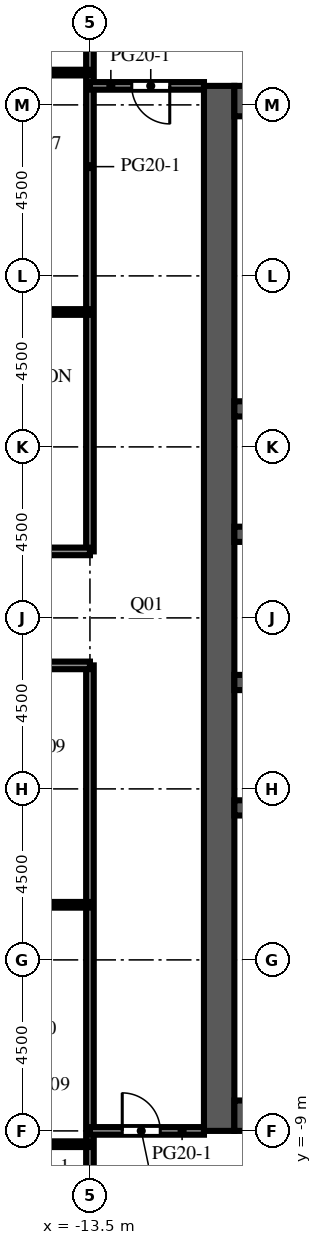
"""IFC4 building model, lengths in metres.
Left out: names, types, materials, properties, quantities, classifications, styles, units other than length and angle.
Written with IfcOpenShell. Run it as: python <this file> out.ifc"""

import sys

from ifc_helpers import new_model, si_unit, direction, frame, frame_2d, origin, place, context, subcontext, project, spatial, rectangle, extrude, element, fill, save


model = new_model("IFC4")
c1 = context("Model", 3, precision=1e-05, world=origin(), true_north=direction((0.0, 1.0)))
c2 = subcontext(c1, "Body", "Model", "MODEL_VIEW")
j1 = project(units=[si_unit("LENGTHUNIT", "METRE"), si_unit("PLANEANGLEUNIT", "RADIAN")], contexts=[c1])
p1 = place(None, origin())
s1 = spatial("IfcSite", under=j1, at=p1, CompositionType="ELEMENT")
p2 = place(p1, origin())
s2 = spatial("IfcBuilding", under=s1, at=p2, CompositionType="ELEMENT")
p3 = place(p2, frame((0.0, 0.0, 207.9)))
s3 = spatial("IfcBuildingStorey", under=s2, at=p3, CompositionType="ELEMENT", Elevation=207.9)
p4 = place(p3, frame((-10.1, -9.0, 0.0), z_axis=(0.0, 0.0, 1.0), x_axis=(0.0, 1.0, 0.0)))
e1 = element("IfcWall", 1, at=p4, inside=s3, PredefinedType="SHEAR", context=c2, shape_type="SweptSolid", body=[
    extrude(rectangle(XDim=27.5, YDim=0.8, at=frame_2d((13.75, 0.0))), origin(), (0.0, 0.0, 1.0), 4.1),
])
p5 = place(p4, frame((12.55, 0.0, 0.0)))
e2 = element("IfcOpeningElement", 2, at=p5, cuts=e1, PredefinedType="OPENING", context=c2, shape_type="SweptSolid", body=[
    extrude(rectangle(XDim=2.4, YDim=2.4, at=frame_2d((1.2, 1.2))), frame((0.0, 0.41, 0.0), z_axis=(0.0, -1.0, 0.0), x_axis=(1.0, 0.0, 0.0)), (0.0, 0.0, 1.0), 0.82),
])
p6 = place(p4, frame((6.825, 0.0, 0.0)))
e3 = element("IfcOpeningElement", 3, at=p6, cuts=e1, PredefinedType="OPENING", context=c2, shape_type="SweptSolid", body=[
    extrude(rectangle(XDim=1.2, YDim=2.1, at=frame_2d((0.6, 1.05))), frame((0.0, 0.41, 0.0), z_axis=(0.0, -1.0, 0.0), x_axis=(1.0, 0.0, 0.0)), (0.0, 0.0, 1.0), 0.82),
])
p7 = place(p4, frame((19.475, 0.0, 0.0)))
e4 = element("IfcOpeningElement", 4, at=p7, cuts=e1, PredefinedType="OPENING", context=c2, shape_type="SweptSolid", body=[
    extrude(rectangle(XDim=1.2, YDim=2.1, at=frame_2d((0.6, 1.05))), frame((0.0, 0.41, 0.0), z_axis=(0.0, -1.0, 0.0), x_axis=(1.0, 0.0, 0.0)), (0.0, 0.0, 1.0), 0.82),
])
for number, where, z_axis, x_axis in (
    (5, (-9.7, -8.6, 0.0), (0.0, 0.0, 1.0), (1.0, 0.0, 0.0)),
    (6, (-9.7, 18.1, 0.0), (0.0, 0.0, 1.0), (1.0, 0.0, 0.0)),
):
    element("IfcWall", number, at=place(p3, frame(where, z_axis=z_axis, x_axis=x_axis)), inside=s3, PredefinedType="SHEAR", context=c2, shape_type="SweptSolid", body=[
        extrude(rectangle(XDim=10.4, YDim=0.8, at=frame_2d((5.2, 0.0))), origin(), (0.0, 0.0, 1.0), 4.1),
    ])
p8 = place(p3, frame((-9.7, -0.5, 0.0), z_axis=(0.0, 0.0, 1.0), x_axis=(1.0, 0.0, 0.0)))
e7 = element("IfcWall", 7, at=p8, inside=s3, PredefinedType="SHEAR", context=c2, shape_type="SweptSolid", body=[
    extrude(rectangle(XDim=10.4, YDim=0.4, at=frame_2d((5.2, 0.0))), origin(), (0.0, 0.0, 1.0), 4.1),
])
p9 = place(p3, frame((-9.7, 2.8, 0.0), z_axis=(0.0, 0.0, 1.0), x_axis=(1.0, 0.0, 0.0)))
e8 = element("IfcWall", 8, at=p9, inside=s3, PredefinedType="SHEAR", context=c2, shape_type="SweptSolid", body=[
    extrude(rectangle(XDim=10.4, YDim=0.4, at=frame_2d((5.2, 0.0))), origin(), (0.0, 0.0, 1.0), 4.1),
])
p10 = place(p9, frame((0.738, 0.0, 0.0)))
e9 = element("IfcOpeningElement", 9, at=p10, cuts=e8, PredefinedType="OPENING", context=c2, shape_type="SweptSolid", body=[
    extrude(rectangle(XDim=1.1, YDim=2.1, at=frame_2d((0.55, 1.05))), frame((0.0, 0.21, 0.0), z_axis=(0.0, -1.0, 0.0), x_axis=(1.0, 0.0, 0.0)), (0.0, 0.0, 1.0), 0.42),
])
p11 = place(p9, frame((3.337, 0.0, 0.0)))
e10 = element("IfcOpeningElement", 10, at=p11, cuts=e8, PredefinedType="OPENING", context=c2, shape_type="SweptSolid", body=[
    extrude(rectangle(XDim=1.1, YDim=2.1, at=frame_2d((0.55, 1.05))), frame((0.0, 0.21, 0.0), z_axis=(0.0, -1.0, 0.0), x_axis=(1.0, 0.0, 0.0)), (0.0, 0.0, 1.0), 0.42),
])
p12 = place(p9, frame((6.012, 0.0, 0.0)))
e11 = element("IfcOpeningElement", 11, at=p12, cuts=e8, PredefinedType="OPENING", context=c2, shape_type="SweptSolid", body=[
    extrude(rectangle(XDim=1.0, YDim=2.1, at=frame_2d((0.5, 1.05))), frame((0.0, 0.21, 0.0), z_axis=(0.0, -1.0, 0.0), x_axis=(1.0, 0.0, 0.0)), (0.0, 0.0, 1.0), 0.42),
])
p13 = place(p9, frame((8.613, 0.0, 0.0)))
e12 = element("IfcOpeningElement", 12, at=p13, cuts=e8, PredefinedType="OPENING", context=c2, shape_type="SweptSolid", body=[
    extrude(rectangle(XDim=1.0, YDim=2.1, at=frame_2d((0.5, 1.05))), frame((0.0, 0.21, 0.0), z_axis=(0.0, -1.0, 0.0), x_axis=(1.0, 0.0, 0.0)), (0.0, 0.0, 1.0), 0.42),
])
p14 = place(p3, frame((-9.7, 6.7, 0.0), z_axis=(0.0, 0.0, 1.0), x_axis=(1.0, 0.0, 0.0)))
e13 = element("IfcWall", 13, at=p14, inside=s3, PredefinedType="SHEAR", context=c2, shape_type="SweptSolid", body=[
    extrude(rectangle(XDim=10.4, YDim=0.4, at=frame_2d((5.2, 0.0))), origin(), (0.0, 0.0, 1.0), 4.1),
])
p15 = place(p14, frame((3.337, 0.0, 0.0)))
e14 = element("IfcOpeningElement", 14, at=p15, cuts=e13, PredefinedType="OPENING", context=c2, shape_type="SweptSolid", body=[
    extrude(rectangle(XDim=1.1, YDim=2.1, at=frame_2d((0.55, 1.05))), frame((0.0, 0.21, 0.0), z_axis=(0.0, -1.0, 0.0), x_axis=(1.0, 0.0, 0.0)), (0.0, 0.0, 1.0), 0.42),
])
p16 = place(p14, frame((5.962, 0.0, 0.0)))
e15 = element("IfcOpeningElement", 15, at=p16, cuts=e13, PredefinedType="OPENING", context=c2, shape_type="SweptSolid", body=[
    extrude(rectangle(XDim=1.1, YDim=2.1, at=frame_2d((0.55, 1.05))), frame((0.0, 0.21, 0.0), z_axis=(0.0, -1.0, 0.0), x_axis=(1.0, 0.0, 0.0)), (0.0, 0.0, 1.0), 0.42),
])
p17 = place(p14, frame((8.663, 0.0, 0.0)))
e16 = element("IfcOpeningElement", 16, at=p17, cuts=e13, PredefinedType="OPENING", context=c2, shape_type="SweptSolid", body=[
    extrude(rectangle(XDim=1.1, YDim=2.1, at=frame_2d((0.55, 1.05))), frame((0.0, 0.21, 0.0), z_axis=(0.0, -1.0, 0.0), x_axis=(1.0, 0.0, 0.0)), (0.0, 0.0, 1.0), 0.42),
])
p18 = place(p14, frame((0.688, 0.0, 0.0)))
e17 = element("IfcOpeningElement", 17, at=p18, cuts=e13, PredefinedType="OPENING", context=c2, shape_type="SweptSolid", body=[
    extrude(rectangle(XDim=1.0, YDim=2.1, at=frame_2d((0.5, 1.05))), frame((0.0, 0.21, 0.0), z_axis=(0.0, -1.0, 0.0), x_axis=(1.0, 0.0, 0.0)), (0.0, 0.0, 1.0), 0.42),
])
p19 = place(p3, frame((-9.7, 10.0, 0.0), z_axis=(0.0, 0.0, 1.0), x_axis=(1.0, 0.0, 0.0)))
e18 = element("IfcWall", 18, at=p19, inside=s3, PredefinedType="SHEAR", context=c2, shape_type="SweptSolid", body=[
    extrude(rectangle(XDim=10.4, YDim=0.4, at=frame_2d((5.2, 0.0))), origin(), (0.0, 0.0, 1.0), 4.1),
])
p20 = place(p3, frame((-13.5, -26.5, 0.0), z_axis=(0.0, 0.0, 1.0), x_axis=(0.0, 1.0, 0.0)))
e19 = element("IfcWall", 19, at=p20, inside=s3, PredefinedType="PARTITIONING", context=c2, shape_type="SweptSolid", body=[
    extrude(rectangle(XDim=29.75, YDim=0.2, at=frame_2d((14.875, 0.0))), origin(), (0.0, 0.0, 1.0), 3.65),
])
p21 = place(p3, frame((-13.5, 6.25, 0.0), z_axis=(0.0, 0.0, 1.0), x_axis=(0.0, 1.0, 0.0)))
e20 = element("IfcWall", 20, at=p21, inside=s3, PredefinedType="PARTITIONING", context=c2, shape_type="SweptSolid", body=[
    extrude(rectangle(XDim=20.25, YDim=0.2, at=frame_2d((10.125, 0.0))), origin(), (0.0, 0.0, 1.0), 3.65),
])
p22 = place(p3, frame((-13.5, -9.35, 0.0), z_axis=(0.0, 0.0, 1.0), x_axis=(-1.0, 0.0, 0.0)))
e21 = element("IfcWall", 21, at=p22, inside=s3, PredefinedType="PARTITIONING", context=c2, shape_type="SweptSolid", body=[
    extrude(rectangle(XDim=3.9, YDim=0.15, at=frame_2d((1.95, 0.0))), origin(), (0.0, 0.0, 1.0), 3.65),
])
p23 = place(p22, frame((2.65, 0.0, 0.0)))
e22 = element("IfcOpeningElement", 22, at=p23, cuts=e21, PredefinedType="OPENING", context=c2, shape_type="SweptSolid", body=[
    extrude(rectangle(XDim=1.0, YDim=2.1, at=frame_2d((0.5, 1.05))), frame((0.0, 0.085, 0.0), z_axis=(0.0, -1.0, 0.0), x_axis=(1.0, 0.0, 0.0)), (0.0, 0.0, 1.0), 0.17),
])
p24 = place(p3, frame((-10.5, -9.0, 0.0), z_axis=(0.0, 0.0, 1.0), x_axis=(-1.0, 0.0, 0.0)))
e23 = element("IfcWall", 23, at=p24, inside=s3, PredefinedType="PARTITIONING", context=c2, shape_type="SweptSolid", body=[
    extrude(rectangle(XDim=3.0, YDim=0.2, at=frame_2d((1.5, 0.0))), origin(), (0.0, 0.0, 1.0), 3.65),
])
p25 = place(p24, frame((1.15, 0.0, 0.0)))
e24 = element("IfcOpeningElement", 24, at=p25, cuts=e23, PredefinedType="OPENING", context=c2, shape_type="SweptSolid", body=[
    extrude(rectangle(XDim=1.0, YDim=2.1, at=frame_2d((0.5, 1.05))), frame((0.0, 0.11, 0.0), z_axis=(0.0, -1.0, 0.0), x_axis=(1.0, 0.0, 0.0)), (0.0, 0.0, 1.0), 0.22),
])
p26 = place(p3, frame((-13.5, -3.05, 0.0), z_axis=(0.0, 0.0, 1.0), x_axis=(-1.0, 0.0, 0.0)))
e25 = element("IfcWall", 25, at=p26, inside=s3, PredefinedType="PARTITIONING", context=c2, shape_type="SweptSolid", body=[
    extrude(rectangle(XDim=8.85, YDim=0.15, at=frame_2d((4.425, 0.0))), origin(), (0.0, 0.0, 1.0), 3.65),
])
p27 = place(p26, frame((3.4, 0.0, 0.0)))
e26 = element("IfcOpeningElement", 26, at=p27, cuts=e25, PredefinedType="OPENING", context=c2, shape_type="SweptSolid", body=[
    extrude(rectangle(XDim=1.0, YDim=2.1, at=frame_2d((0.5, 1.05))), frame((0.0, 0.085, 0.0), z_axis=(0.0, -1.0, 0.0), x_axis=(1.0, 0.0, 0.0)), (0.0, 0.0, 1.0), 0.17),
])
p28 = place(p3, frame((-13.5, 3.25, 0.0), z_axis=(0.0, 0.0, 1.0), x_axis=(-1.0, 0.0, 0.0)))
e27 = element("IfcWall", 27, at=p28, inside=s3, PredefinedType="PARTITIONING", context=c2, shape_type="SweptSolid", body=[
    extrude(rectangle(XDim=8.85, YDim=0.2, at=frame_2d((4.425, 0.0))), origin(), (0.0, 0.0, 1.0), 3.65),
])
p29 = place(p28, frame((4.65, 0.0, 0.0)))
e28 = element("IfcOpeningElement", 28, at=p29, cuts=e27, PredefinedType="OPENING", context=c2, shape_type="SweptSolid", body=[
    extrude(rectangle(XDim=1.0, YDim=2.1, at=frame_2d((0.5, 1.05))), frame((0.0, 0.11, 0.0), z_axis=(0.0, -1.0, 0.0), x_axis=(1.0, 0.0, 0.0)), (0.0, 0.0, 1.0), 0.22),
])
p30 = place(p3, frame((-22.35, 6.25, 0.0), z_axis=(0.0, 0.0, 1.0), x_axis=(1.0, 0.0, 0.0)))
e29 = element("IfcWall", 29, at=p30, inside=s3, PredefinedType="PARTITIONING", context=c2, shape_type="SweptSolid", body=[
    extrude(rectangle(XDim=8.85, YDim=0.2, at=frame_2d((4.425, 0.0))), origin(), (0.0, 0.0, 1.0), 3.65),
])
p31 = place(p30, frame((4.2, 0.0, 0.0)))
e30 = element("IfcOpeningElement", 30, at=p31, cuts=e29, PredefinedType="OPENING", context=c2, shape_type="SweptSolid", body=[
    extrude(rectangle(XDim=1.0, YDim=2.1, at=frame_2d((0.5, 1.05))), frame((0.0, 0.11, 0.0), z_axis=(0.0, -1.0, 0.0), x_axis=(1.0, 0.0, 0.0)), (0.0, 0.0, 1.0), 0.22),
])
p32 = place(p3, frame((-22.35, 12.55, 0.0), z_axis=(0.0, 0.0, 1.0), x_axis=(1.0, 0.0, 0.0)))
e31 = element("IfcWall", 31, at=p32, inside=s3, PredefinedType="PARTITIONING", context=c2, shape_type="SweptSolid", body=[
    extrude(rectangle(XDim=8.85, YDim=0.15, at=frame_2d((4.425, 0.0))), origin(), (0.0, 0.0, 1.0), 3.65),
])
p33 = place(p32, frame((4.2, 0.0, 0.0)))
e32 = element("IfcOpeningElement", 32, at=p33, cuts=e31, PredefinedType="OPENING", context=c2, shape_type="SweptSolid", body=[
    extrude(rectangle(XDim=1.0, YDim=2.1, at=frame_2d((0.5, 1.05))), frame((0.0, 0.085, 0.0), z_axis=(0.0, -1.0, 0.0), x_axis=(1.0, 0.0, 0.0)), (0.0, 0.0, 1.0), 0.17),
])
p34 = place(p3, frame((-13.5, 18.5, 0.0), z_axis=(0.0, 0.0, 1.0), x_axis=(1.0, 0.0, 0.0)))
e33 = element("IfcWall", 33, at=p34, inside=s3, PredefinedType="PARTITIONING", context=c2, shape_type="SweptSolid", body=[
    extrude(rectangle(XDim=3.0, YDim=0.2, at=frame_2d((1.5, 0.0))), origin(), (0.0, 0.0, 1.0), 3.65),
])
p35 = place(p34, frame((1.1, 0.0, 0.0)))
e34 = element("IfcOpeningElement", 34, at=p35, cuts=e33, PredefinedType="OPENING", context=c2, shape_type="SweptSolid", body=[
    extrude(rectangle(XDim=1.0, YDim=2.1, at=frame_2d((0.5, 1.05))), frame((0.0, 0.11, 0.0), z_axis=(0.0, -1.0, 0.0), x_axis=(1.0, 0.0, 0.0)), (0.0, 0.0, 1.0), 0.22),
])
p36 = place(p3, frame((-22.35, 18.85, 0.0), z_axis=(0.0, 0.0, 1.0), x_axis=(1.0, 0.0, 0.0)))
e35 = element("IfcWall", 35, at=p36, inside=s3, PredefinedType="PARTITIONING", context=c2, shape_type="SweptSolid", body=[
    extrude(rectangle(XDim=8.85, YDim=0.15, at=frame_2d((4.425, 0.0))), origin(), (0.0, 0.0, 1.0), 3.65),
])
p37 = place(p36, frame((5.2, 0.0, 0.0)))
e36 = element("IfcOpeningElement", 36, at=p37, cuts=e35, PredefinedType="OPENING", context=c2, shape_type="SweptSolid", body=[
    extrude(rectangle(XDim=1.0, YDim=2.1, at=frame_2d((0.5, 1.05))), frame((0.0, 0.085, 0.0), z_axis=(0.0, -1.0, 0.0), x_axis=(1.0, 0.0, 0.0)), (0.0, 0.0, 1.0), 0.17),
])
p38 = place(p5, origin())
e37 = element("IfcDoor", 37, at=p38, inside=s3, OperationType="DOUBLE_DOOR_DOUBLE_SWING", PredefinedType="DOOR", context=c2, shape_type="SweptSolid", body=[
    extrude(rectangle(XDim=2.4, YDim=2.4, at=frame_2d((1.2, 1.2))), frame((0.0, 0.025, 0.0), z_axis=(0.0, -1.0, 0.0), x_axis=(1.0, 0.0, 0.0)), (0.0, 0.0, 1.0), 0.05),
])
fill(e2, e37)
p39 = place(p6, origin())
e38 = element("IfcDoor", 38, at=p39, inside=s3, OperationType="SINGLE_SWING_LEFT", PredefinedType="DOOR", context=c2, shape_type="SweptSolid", body=[
    extrude(rectangle(XDim=1.2, YDim=2.1, at=frame_2d((0.6, 1.05))), frame((0.0, 0.025, 0.0), z_axis=(0.0, -1.0, 0.0), x_axis=(1.0, 0.0, 0.0)), (0.0, 0.0, 1.0), 0.05),
])
fill(e3, e38)
p40 = place(p7, origin())
e39 = element("IfcDoor", 39, at=p40, inside=s3, OperationType="SINGLE_SWING_LEFT", PredefinedType="DOOR", context=c2, shape_type="SweptSolid", body=[
    extrude(rectangle(XDim=1.2, YDim=2.1, at=frame_2d((0.6, 1.05))), frame((0.0, 0.025, 0.0), z_axis=(0.0, -1.0, 0.0), x_axis=(1.0, 0.0, 0.0)), (0.0, 0.0, 1.0), 0.05),
])
fill(e4, e39)
p41 = place(p25, origin())
e40 = element("IfcDoor", 40, at=p41, inside=s3, OperationType="SINGLE_SWING_RIGHT", PredefinedType="DOOR", context=c2, shape_type="SweptSolid", body=[
    extrude(rectangle(XDim=1.0, YDim=2.1, at=frame_2d((0.5, 1.05))), frame((0.0, 0.025, 0.0), z_axis=(0.0, -1.0, 0.0), x_axis=(1.0, 0.0, 0.0)), (0.0, 0.0, 1.0), 0.05),
])
fill(e24, e40)
p42 = place(p35, origin())
e41 = element("IfcDoor", 41, at=p42, inside=s3, OperationType="SINGLE_SWING_RIGHT", PredefinedType="DOOR", context=c2, shape_type="SweptSolid", body=[
    extrude(rectangle(XDim=1.0, YDim=2.1, at=frame_2d((0.5, 1.05))), frame((0.0, 0.025, 0.0), z_axis=(0.0, -1.0, 0.0), x_axis=(1.0, 0.0, 0.0)), (0.0, 0.0, 1.0), 0.05),
])
fill(e34, e41)
save(model, sys.argv[1])
